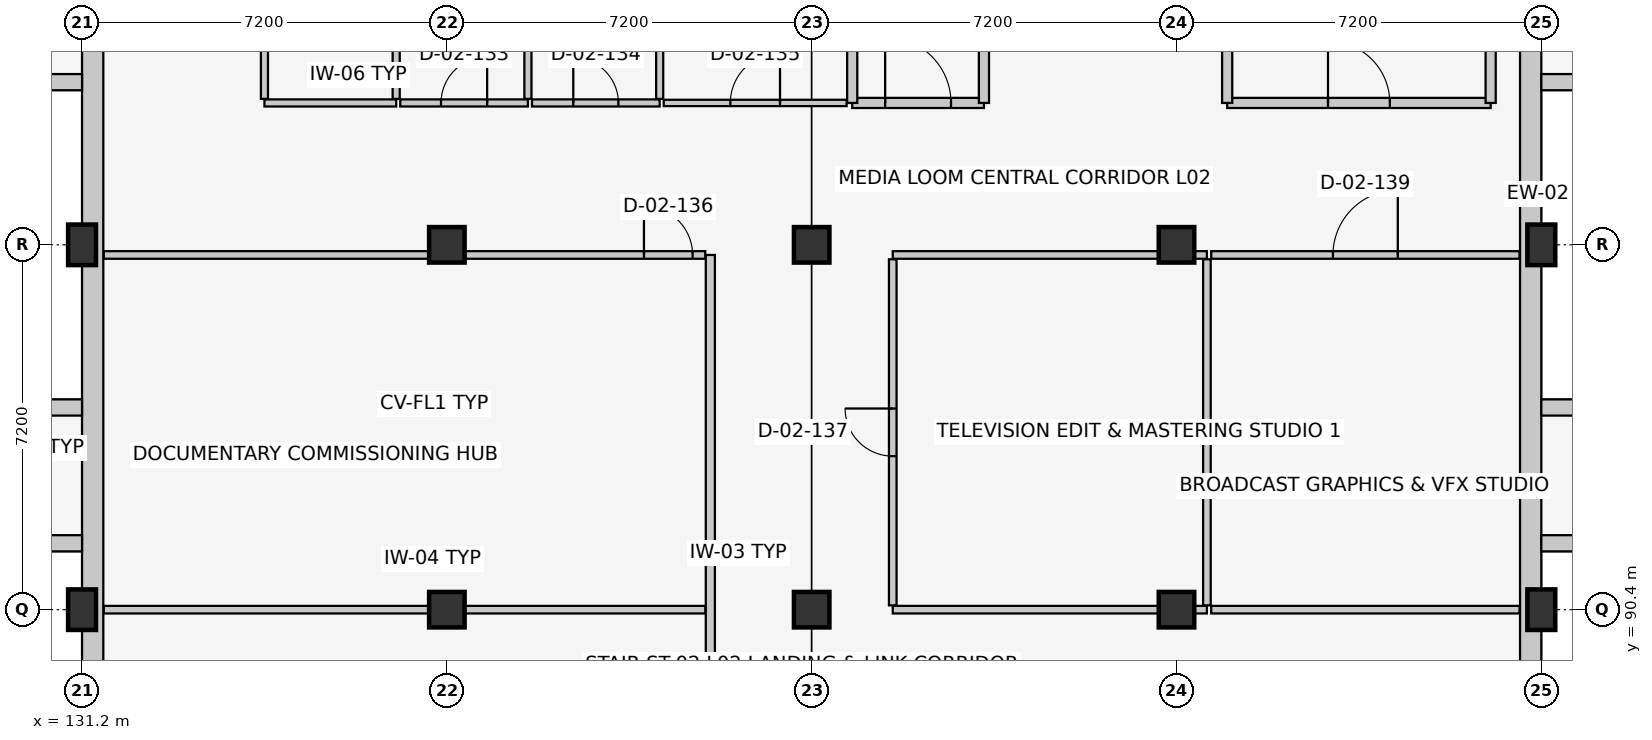
"""IFC4 building model, lengths in metres.
Left out: names, types, materials, properties, quantities, classifications, styles, units other than length and angle.
Written with IfcOpenShell. Run it as: python <this file> out.ifc"""

import sys

from ifc_helpers import new_model, si_unit, direction, frame, frame_2d, origin, origin_2d, place, context, subcontext, project, spatial, rectangle, extrude, element, fill, save


model = new_model("IFC4")
c1 = context("Model", 3, precision=1e-05, world=origin(), true_north=direction((0.0, 1.0)))
c2 = subcontext(c1, "Body", "Model", "MODEL_VIEW")
j1 = project(units=[si_unit("LENGTHUNIT", "METRE"), si_unit("PLANEANGLEUNIT", "RADIAN")], contexts=[c1])
p1 = place(None, origin())
s1 = spatial("IfcSite", under=j1, at=p1, CompositionType="ELEMENT")
p2 = place(p1, origin())
s2 = spatial("IfcBuilding", under=s1, at=p2, CompositionType="ELEMENT")
p3 = place(p2, frame((0.0, 0.0, 9.6)))
s3 = spatial("IfcBuildingStorey", under=s2, at=p3, CompositionType="ELEMENT", Elevation=9.6)
for number, where, z_axis, x_axis in (
    (1, (131.2, 90.4, 0.0), (0.0, 0.0, 1.0), (1.0, 0.0, 0.0)),
    (2, (131.2, 97.6, 0.0), (0.0, 0.0, 1.0), (1.0, 0.0, 0.0)),
):
    element("IfcColumn", number, at=place(p3, frame(where, z_axis=z_axis, x_axis=x_axis)), inside=s3, PredefinedType="COLUMN", context=c2, shape_type="SweptSolid", body=[
        extrude(rectangle(XDim=0.55, YDim=0.8, at=origin_2d()), origin(), (0.0, 0.0, 1.0), 4.2),
    ])
for number, where, z_axis, x_axis in (
    (3, (138.4, 90.4, 0.0), (0.0, 0.0, 1.0), (1.0, 0.0, 0.0)),
    (4, (138.4, 97.6, 0.0), (0.0, 0.0, 1.0), (1.0, 0.0, 0.0)),
    (5, (145.6, 90.4, 0.0), (0.0, 0.0, 1.0), (1.0, 0.0, 0.0)),
    (6, (145.6, 97.6, 0.0), (0.0, 0.0, 1.0), (1.0, 0.0, 0.0)),
    (7, (152.8, 90.4, 0.0), (0.0, 0.0, 1.0), (1.0, 0.0, 0.0)),
    (8, (152.8, 97.6, 0.0), (0.0, 0.0, 1.0), (1.0, 0.0, 0.0)),
):
    element("IfcColumn", number, at=place(p3, frame(where, z_axis=z_axis, x_axis=x_axis)), inside=s3, PredefinedType="COLUMN", context=c2, shape_type="SweptSolid", body=[
        extrude(rectangle(XDim=0.7, YDim=0.7, at=origin_2d()), origin(), (0.0, 0.0, 1.0), 4.2),
    ])
for number, where, z_axis, x_axis in (
    (9, (160.0, 90.4, 0.0), (0.0, 0.0, 1.0), (1.0, 0.0, 0.0)),
    (10, (160.0, 97.6, 0.0), (0.0, 0.0, 1.0), (1.0, 0.0, 0.0)),
):
    element("IfcColumn", number, at=place(p3, frame(where, z_axis=z_axis, x_axis=x_axis)), inside=s3, PredefinedType="COLUMN", context=c2, shape_type="SweptSolid", body=[
        extrude(rectangle(XDim=0.55, YDim=0.8, at=origin_2d()), origin(), (0.0, 0.0, 1.0), 4.2),
    ])
p4 = place(p3, frame((159.79, 112.0, 0.0), z_axis=(0.0, 0.0, 1.0), x_axis=(0.0, -1.0, 0.0)))
e11 = element("IfcWall", 11, at=p4, inside=s3, PredefinedType="SOLIDWALL", context=c2, shape_type="SweptSolid", body=[
    extrude(rectangle(XDim=28.8, YDim=0.42, at=frame_2d((14.4, 0.0))), origin(), (0.0, 0.0, 1.0), 3.345),
])
p5 = place(p3, frame((160.0, 91.71, 0.0), z_axis=(0.0, 0.0, 1.0), x_axis=(1.0, 0.0, 0.0)))
e12 = element("IfcWall", 12, at=p5, inside=s3, PredefinedType="SOLIDWALL", context=c2, shape_type="SweptSolid", body=[
    extrude(rectangle(XDim=1.35, YDim=0.32, at=frame_2d((0.675, 0.0))), origin(), (0.0, 0.0, 1.0), 3.93),
])
for number, where, z_axis, x_axis in (
    (13, (160.0, 94.39, 0.0), (0.0, 0.0, 1.0), (1.0, 0.0, 0.0)),
    (14, (160.0, 100.81, 0.0), (0.0, 0.0, 1.0), (1.0, 0.0, 0.0)),
):
    element("IfcWall", number, at=place(p3, frame(where, z_axis=z_axis, x_axis=x_axis)), inside=s3, PredefinedType="SOLIDWALL", context=c2, shape_type="SweptSolid", body=[
        extrude(rectangle(XDim=1.793, YDim=0.32, at=frame_2d((0.896, 0.0))), origin(), (0.0, 0.0, 1.0), 3.93),
    ])
p6 = place(p3, frame((131.41, 83.2, 0.0), z_axis=(0.0, 0.0, 1.0), x_axis=(0.0, 1.0, 0.0)))
e15 = element("IfcWall", 15, at=p6, inside=s3, PredefinedType="SOLIDWALL", context=c2, shape_type="SweptSolid", body=[
    extrude(rectangle(XDim=28.8, YDim=0.42, at=frame_2d((14.4, 0.0))), origin(), (0.0, 0.0, 1.0), 3.345),
])
p7 = place(p3, frame((131.2, 91.71, 0.0), z_axis=(0.0, 0.0, 1.0), x_axis=(-1.0, 0.0, 0.0)))
e16 = element("IfcWall", 16, at=p7, inside=s3, PredefinedType="SOLIDWALL", context=c2, shape_type="SweptSolid", body=[
    extrude(rectangle(XDim=1.793, YDim=0.32, at=frame_2d((0.896, 0.0))), origin(), (0.0, 0.0, 1.0), 3.93),
])
for number, where, z_axis, x_axis in (
    (17, (131.2, 94.39, 0.0), (0.0, 0.0, 1.0), (-1.0, 0.0, 0.0)),
    (18, (131.2, 100.81, 0.0), (0.0, 0.0, 1.0), (-1.0, 0.0, 0.0)),
):
    element("IfcWall", number, at=place(p3, frame(where, z_axis=z_axis, x_axis=x_axis)), inside=s3, PredefinedType="SOLIDWALL", context=c2, shape_type="SweptSolid", body=[
        extrude(rectangle(XDim=1.35, YDim=0.32, at=frame_2d((0.675, 0.0))), origin(), (0.0, 0.0, 1.0), 3.93),
    ])
p8 = place(p3, frame((146.4, 100.4, 0.0), z_axis=(0.0, 0.0, 1.0), x_axis=(1.0, 0.0, 0.0)))
e19 = element("IfcWall", 19, at=p8, inside=s3, PredefinedType="PARTITIONING", context=c2, shape_type="SweptSolid", body=[
    extrude(rectangle(XDim=2.6, YDim=0.2, at=frame_2d((1.3, 0.0))), origin(), (0.0, 0.0, 1.0), 3.95),
])
p9 = place(p8, frame((0.65, 0.0, 0.0)))
e20 = element("IfcOpeningElement", 20, at=p9, cuts=e19, PredefinedType="OPENING", context=c2, shape_type="SweptSolid", body=[
    extrude(rectangle(XDim=1.3, YDim=2.2, at=frame_2d((0.65, 1.1))), frame((0.0, 0.112, 0.0), z_axis=(0.0, -1.0, 0.0), x_axis=(1.0, 0.0, 0.0)), (0.0, 0.0, 1.0), 0.224),
])
p10 = place(p3, frame((146.4, 106.2, 0.0), z_axis=(0.0, 0.0, 1.0), x_axis=(0.0, -1.0, 0.0)))
e21 = element("IfcWall", 21, at=p10, inside=s3, PredefinedType="PARTITIONING", context=c2, shape_type="SweptSolid", body=[
    extrude(rectangle(XDim=5.8, YDim=0.2, at=frame_2d((2.9, 0.0))), origin(), (0.0, 0.0, 1.0), 3.95),
])
p11 = place(p3, frame((149.0, 100.4, 0.0), z_axis=(0.0, 0.0, 1.0), x_axis=(0.0, 1.0, 0.0)))
e22 = element("IfcWall", 22, at=p11, inside=s3, PredefinedType="PARTITIONING", context=c2, shape_type="SweptSolid", body=[
    extrude(rectangle(XDim=5.8, YDim=0.2, at=frame_2d((2.9, 0.0))), origin(), (0.0, 0.0, 1.0), 3.705),
])
p12 = place(p3, frame((153.8, 100.4, 0.0), z_axis=(0.0, 0.0, 1.0), x_axis=(1.0, 0.0, 0.0)))
e23 = element("IfcWall", 23, at=p12, inside=s3, PredefinedType="PARTITIONING", context=c2, shape_type="SweptSolid", body=[
    extrude(rectangle(XDim=5.2, YDim=0.2, at=frame_2d((2.6, 0.0))), origin(), (0.0, 0.0, 1.0), 3.95),
])
p13 = place(p12, frame((1.99, 0.0, 0.0)))
e24 = element("IfcOpeningElement", 24, at=p13, cuts=e23, PredefinedType="OPENING", context=c2, shape_type="SweptSolid", body=[
    extrude(rectangle(XDim=1.22, YDim=2.2, at=frame_2d((0.61, 1.1))), frame((0.0, 0.112, 0.0), z_axis=(0.0, -1.0, 0.0), x_axis=(1.0, 0.0, 0.0)), (0.0, 0.0, 1.0), 0.224),
])
for number, where, z_axis, x_axis in (
    (25, (153.8, 106.2, 0.0), (0.0, 0.0, 1.0), (0.0, -1.0, 0.0)),
    (26, (159.0, 100.4, 0.0), (0.0, 0.0, 1.0), (0.0, 1.0, 0.0)),
):
    element("IfcWall", number, at=place(p3, frame(where, z_axis=z_axis, x_axis=x_axis)), inside=s3, PredefinedType="PARTITIONING", context=c2, shape_type="SweptSolid", body=[
        extrude(rectangle(XDim=5.8, YDim=0.2, at=frame_2d((2.9, 0.0))), origin(), (0.0, 0.0, 1.0), 3.95),
    ])
p14 = place(p3, frame((143.6, 83.63, 0.0), z_axis=(0.0, 0.0, 1.0), x_axis=(0.0, 1.0, 0.0)))
e27 = element("IfcWall", 27, at=p14, inside=s3, PredefinedType="PARTITIONING", context=c2, shape_type="SweptSolid", body=[
    extrude(rectangle(XDim=13.77, YDim=0.18, at=frame_2d((6.885, 0.0))), origin(), (0.0, 0.0, 1.0), 3.95),
])
p15 = place(p14, frame((2.925, 0.0, 0.0)))
e28 = element("IfcOpeningElement", 28, at=p15, cuts=e27, PredefinedType="OPENING", context=c2, shape_type="SweptSolid", body=[
    extrude(rectangle(XDim=0.92, YDim=2.08, at=frame_2d((0.46, 1.04))), frame((0.0, 0.102, 0.0), z_axis=(0.0, -1.0, 0.0), x_axis=(1.0, 0.0, 0.0)), (0.0, 0.0, 1.0), 0.204),
])
p16 = place(p3, frame((134.8, 100.4, 0.0), z_axis=(0.0, 0.0, 1.0), x_axis=(1.0, 0.0, 0.0)))
e29 = element("IfcWall", 29, at=p16, inside=s3, PredefinedType="PARTITIONING", context=c2, shape_type="SweptSolid", body=[
    extrude(rectangle(XDim=2.6, YDim=0.14, at=frame_2d((1.3, 0.0))), origin(), (0.0, 0.0, 1.0), 3.95),
])
p17 = place(p3, frame((134.8, 100.48, 0.0), z_axis=(0.0, 0.0, 1.0), x_axis=(0.0, 1.0, 0.0)))
e30 = element("IfcWall", 30, at=p17, inside=s3, PredefinedType="PARTITIONING", context=c2, shape_type="SweptSolid", body=[
    extrude(rectangle(XDim=4.86, YDim=0.14, at=frame_2d((2.43, 0.0))), origin(), (0.0, 0.0, 1.0), 3.675),
])
p18 = place(p17, frame((1.93, 0.0, 0.0)))
e31 = element("IfcOpeningElement", 31, at=p18, cuts=e30, PredefinedType="OPENING", context=c2, shape_type="SweptSolid", body=[
    extrude(rectangle(XDim=1.0, YDim=2.1, at=frame_2d((0.5, 1.05))), frame((0.0, 0.082, 0.0), z_axis=(0.0, -1.0, 0.0), x_axis=(1.0, 0.0, 0.0)), (0.0, 0.0, 1.0), 0.164),
])
p19 = place(p3, frame((137.4, 100.48, 0.0), z_axis=(0.0, 0.0, 1.0), x_axis=(0.0, 1.0, 0.0)))
e32 = element("IfcWall", 32, at=p19, inside=s3, PredefinedType="PARTITIONING", context=c2, shape_type="SweptSolid", body=[
    extrude(rectangle(XDim=4.86, YDim=0.14, at=frame_2d((2.43, 0.0))), origin(), (0.0, 0.0, 1.0), 3.95),
])
p20 = place(p3, frame((137.48, 100.4, 0.0), z_axis=(0.0, 0.0, 1.0), x_axis=(1.0, 0.0, 0.0)))
e33 = element("IfcWall", 33, at=p20, inside=s3, PredefinedType="PARTITIONING", context=c2, shape_type="SweptSolid", body=[
    extrude(rectangle(XDim=2.52, YDim=0.14, at=frame_2d((1.26, 0.0))), origin(), (0.0, 0.0, 1.0), 3.95),
])
p21 = place(p20, frame((0.805, 0.0, 0.0)))
e34 = element("IfcOpeningElement", 34, at=p21, cuts=e33, PredefinedType="OPENING", context=c2, shape_type="SweptSolid", body=[
    extrude(rectangle(XDim=0.91, YDim=2.06, at=frame_2d((0.455, 1.03))), frame((0.0, 0.082, 0.0), z_axis=(0.0, -1.0, 0.0), x_axis=(1.0, 0.0, 0.0)), (0.0, 0.0, 1.0), 0.164),
])
p22 = place(p3, frame((140.0, 100.48, 0.0), z_axis=(0.0, 0.0, 1.0), x_axis=(0.0, 1.0, 0.0)))
e35 = element("IfcWall", 35, at=p22, inside=s3, PredefinedType="PARTITIONING", context=c2, shape_type="SweptSolid", body=[
    extrude(rectangle(XDim=4.86, YDim=0.14, at=frame_2d((2.43, 0.0))), origin(), (0.0, 0.0, 1.0), 3.95),
])
p23 = place(p3, frame((140.08, 100.4, 0.0), z_axis=(0.0, 0.0, 1.0), x_axis=(1.0, 0.0, 0.0)))
e36 = element("IfcWall", 36, at=p23, inside=s3, PredefinedType="PARTITIONING", context=c2, shape_type="SweptSolid", body=[
    extrude(rectangle(XDim=2.52, YDim=0.14, at=frame_2d((1.26, 0.0))), origin(), (0.0, 0.0, 1.0), 3.95),
])
p24 = place(p23, frame((0.815, 0.0, 0.0)))
e37 = element("IfcOpeningElement", 37, at=p24, cuts=e36, PredefinedType="OPENING", context=c2, shape_type="SweptSolid", body=[
    extrude(rectangle(XDim=0.89, YDim=2.05, at=frame_2d((0.445, 1.025))), frame((0.0, 0.082, 0.0), z_axis=(0.0, -1.0, 0.0), x_axis=(1.0, 0.0, 0.0)), (0.0, 0.0, 1.0), 0.164),
])
p25 = place(p3, frame((142.6, 100.48, 0.0), z_axis=(0.0, 0.0, 1.0), x_axis=(0.0, 1.0, 0.0)))
e38 = element("IfcWall", 38, at=p25, inside=s3, PredefinedType="PARTITIONING", context=c2, shape_type="SweptSolid", body=[
    extrude(rectangle(XDim=4.86, YDim=0.14, at=frame_2d((2.43, 0.0))), origin(), (0.0, 0.0, 1.0), 3.95),
])
p26 = place(p3, frame((142.68, 100.4, 0.0), z_axis=(0.0, 0.0, 1.0), x_axis=(1.0, 0.0, 0.0)))
e39 = element("IfcWall", 39, at=p26, inside=s3, PredefinedType="PARTITIONING", context=c2, shape_type="SweptSolid", body=[
    extrude(rectangle(XDim=3.61, YDim=0.125, at=frame_2d((1.805, 0.0))), origin(), (0.0, 0.0, 1.0), 3.95),
])
p27 = place(p26, frame((1.315, 0.0, 0.0)))
e40 = element("IfcOpeningElement", 40, at=p27, cuts=e39, PredefinedType="OPENING", context=c2, shape_type="SweptSolid", body=[
    extrude(rectangle(XDim=0.98, YDim=2.12, at=frame_2d((0.49, 1.06))), frame((0.0, 0.074, 0.0), z_axis=(0.0, -1.0, 0.0), x_axis=(1.0, 0.0, 0.0)), (0.0, 0.0, 1.0), 0.149),
])
p28 = place(p3, frame((131.63, 90.4, 0.0), z_axis=(0.0, 0.0, 1.0), x_axis=(1.0, 0.0, 0.0)))
e41 = element("IfcWall", 41, at=p28, inside=s3, PredefinedType="PARTITIONING", context=c2, shape_type="SweptSolid", body=[
    extrude(rectangle(XDim=11.87, YDim=0.15, at=frame_2d((5.935, 0.0))), origin(), (0.0, 0.0, 1.0), 3.225),
])
p29 = place(p3, frame((131.63, 97.4, 0.0), z_axis=(0.0, 0.0, 1.0), x_axis=(1.0, 0.0, 0.0)))
e42 = element("IfcWall", 42, at=p29, inside=s3, PredefinedType="PARTITIONING", context=c2, shape_type="SweptSolid", body=[
    extrude(rectangle(XDim=11.87, YDim=0.15, at=frame_2d((5.935, 0.0))), origin(), (0.0, 0.0, 1.0), 3.225),
])
p30 = place(p29, frame((10.66, 0.0, 0.0)))
e43 = element("IfcOpeningElement", 43, at=p30, cuts=e42, PredefinedType="OPENING", context=c2, shape_type="SweptSolid", body=[
    extrude(rectangle(XDim=0.96, YDim=2.1, at=frame_2d((0.48, 1.05))), frame((0.0, 0.087, 0.0), z_axis=(0.0, -1.0, 0.0), x_axis=(1.0, 0.0, 0.0)), (0.0, 0.0, 1.0), 0.174),
])
for number, where, z_axis, x_axis in (
    (44, (147.2, 90.4, 0.0), (0.0, 0.0, 1.0), (1.0, 0.0, 0.0)),
    (45, (147.2, 97.4, 0.0), (0.0, 0.0, 1.0), (1.0, 0.0, 0.0)),
):
    element("IfcWall", number, at=place(p3, frame(where, z_axis=z_axis, x_axis=x_axis)), inside=s3, PredefinedType="PARTITIONING", context=c2, shape_type="SweptSolid", body=[
        extrude(rectangle(XDim=6.2, YDim=0.15, at=frame_2d((3.1, 0.0))), origin(), (0.0, 0.0, 1.0), 3.075),
    ])
p31 = place(p3, frame((147.2, 90.485, 0.0), z_axis=(0.0, 0.0, 1.0), x_axis=(0.0, 1.0, 0.0)))
e46 = element("IfcWall", 46, at=p31, inside=s3, PredefinedType="PARTITIONING", context=c2, shape_type="SweptSolid", body=[
    extrude(rectangle(XDim=6.83, YDim=0.15, at=frame_2d((3.415, 0.0))), origin(), (0.0, 0.0, 1.0), 3.95),
])
p32 = place(p31, frame((2.945, 0.0, 0.0)))
e47 = element("IfcOpeningElement", 47, at=p32, cuts=e46, PredefinedType="OPENING", context=c2, shape_type="SweptSolid", body=[
    extrude(rectangle(XDim=0.94, YDim=2.1, at=frame_2d((0.47, 1.05))), frame((0.0, 0.087, 0.0), z_axis=(0.0, -1.0, 0.0), x_axis=(1.0, 0.0, 0.0)), (0.0, 0.0, 1.0), 0.174),
])
p33 = place(p3, frame((153.4, 90.485, 0.0), z_axis=(0.0, 0.0, 1.0), x_axis=(0.0, 1.0, 0.0)))
e48 = element("IfcWall", 48, at=p33, inside=s3, PredefinedType="PARTITIONING", context=c2, shape_type="SweptSolid", body=[
    extrude(rectangle(XDim=6.83, YDim=0.15, at=frame_2d((3.415, 0.0))), origin(), (0.0, 0.0, 1.0), 3.95),
])
p34 = place(p3, frame((153.485, 90.4, 0.0), z_axis=(0.0, 0.0, 1.0), x_axis=(1.0, 0.0, 0.0)))
e49 = element("IfcWall", 49, at=p34, inside=s3, PredefinedType="PARTITIONING", context=c2, shape_type="SweptSolid", body=[
    extrude(rectangle(XDim=6.085, YDim=0.15, at=frame_2d((3.042, 0.0))), origin(), (0.0, 0.0, 1.0), 3.075),
])
p35 = place(p3, frame((153.485, 97.4, 0.0), z_axis=(0.0, 0.0, 1.0), x_axis=(1.0, 0.0, 0.0)))
e50 = element("IfcWall", 50, at=p35, inside=s3, PredefinedType="PARTITIONING", context=c2, shape_type="SweptSolid", body=[
    extrude(rectangle(XDim=6.085, YDim=0.15, at=frame_2d((3.042, 0.0))), origin(), (0.0, 0.0, 1.0), 3.075),
])
p36 = place(p35, frame((2.403, 0.0, 0.0)))
e51 = element("IfcOpeningElement", 51, at=p36, cuts=e50, PredefinedType="OPENING", context=c2, shape_type="SweptSolid", body=[
    extrude(rectangle(XDim=1.28, YDim=2.2, at=frame_2d((0.64, 1.1))), frame((0.0, 0.087, 0.0), z_axis=(0.0, -1.0, 0.0), x_axis=(1.0, 0.0, 0.0)), (0.0, 0.0, 1.0), 0.174),
])
p37 = place(p9, origin())
e52 = element("IfcDoor", 52, at=p37, inside=s3, OperationType="SINGLE_SWING_LEFT", PredefinedType="DOOR", context=c2, shape_type="SweptSolid", body=[
    extrude(rectangle(XDim=1.3, YDim=2.2, at=frame_2d((0.65, 1.1))), frame((0.0, 0.025, 0.0), z_axis=(0.0, -1.0, 0.0), x_axis=(1.0, 0.0, 0.0)), (0.0, 0.0, 1.0), 0.05),
])
fill(e20, e52)
p38 = place(p13, origin())
e53 = element("IfcDoor", 53, at=p38, inside=s3, OperationType="SINGLE_SWING_LEFT", PredefinedType="DOOR", context=c2, shape_type="SweptSolid", body=[
    extrude(rectangle(XDim=1.22, YDim=2.2, at=frame_2d((0.61, 1.1))), frame((0.0, 0.025, 0.0), z_axis=(0.0, -1.0, 0.0), x_axis=(1.0, 0.0, 0.0)), (0.0, 0.0, 1.0), 0.05),
])
fill(e24, e53)
p39 = place(p21, origin())
e54 = element("IfcDoor", 54, at=p39, inside=s3, OperationType="SINGLE_SWING_RIGHT", PredefinedType="DOOR", context=c2, shape_type="SweptSolid", body=[
    extrude(rectangle(XDim=0.91, YDim=2.06, at=frame_2d((0.455, 1.03))), frame((0.0, 0.025, 0.0), z_axis=(0.0, -1.0, 0.0), x_axis=(1.0, 0.0, 0.0)), (0.0, 0.0, 1.0), 0.05),
])
fill(e34, e54)
p40 = place(p24, origin())
e55 = element("IfcDoor", 55, at=p40, inside=s3, OperationType="SINGLE_SWING_LEFT", PredefinedType="DOOR", context=c2, shape_type="SweptSolid", body=[
    extrude(rectangle(XDim=0.89, YDim=2.05, at=frame_2d((0.445, 1.025))), frame((0.0, 0.025, 0.0), z_axis=(0.0, -1.0, 0.0), x_axis=(1.0, 0.0, 0.0)), (0.0, 0.0, 1.0), 0.05),
])
fill(e37, e55)
p41 = place(p27, origin())
e56 = element("IfcDoor", 56, at=p41, inside=s3, OperationType="SINGLE_SWING_RIGHT", PredefinedType="DOOR", context=c2, shape_type="SweptSolid", body=[
    extrude(rectangle(XDim=0.98, YDim=2.12, at=frame_2d((0.49, 1.06))), frame((0.0, 0.025, 0.0), z_axis=(0.0, -1.0, 0.0), x_axis=(1.0, 0.0, 0.0)), (0.0, 0.0, 1.0), 0.05),
])
fill(e40, e56)
p42 = place(p30, origin())
e57 = element("IfcDoor", 57, at=p42, inside=s3, OperationType="SINGLE_SWING_LEFT", PredefinedType="DOOR", context=c2, shape_type="SweptSolid", body=[
    extrude(rectangle(XDim=0.96, YDim=2.1, at=frame_2d((0.48, 1.05))), frame((0.0, 0.025, 0.0), z_axis=(0.0, -1.0, 0.0), x_axis=(1.0, 0.0, 0.0)), (0.0, 0.0, 1.0), 0.05),
])
fill(e43, e57)
p43 = place(p32, origin())
e58 = element("IfcDoor", 58, at=p43, inside=s3, OperationType="SINGLE_SWING_RIGHT", PredefinedType="DOOR", context=c2, shape_type="SweptSolid", body=[
    extrude(rectangle(XDim=0.94, YDim=2.1, at=frame_2d((0.47, 1.05))), frame((0.0, 0.025, 0.0), z_axis=(0.0, -1.0, 0.0), x_axis=(1.0, 0.0, 0.0)), (0.0, 0.0, 1.0), 0.05),
])
fill(e47, e58)
p44 = place(p36, origin())
e59 = element("IfcDoor", 59, at=p44, inside=s3, OperationType="SINGLE_SWING_RIGHT", PredefinedType="DOOR", context=c2, shape_type="SweptSolid", body=[
    extrude(rectangle(XDim=1.28, YDim=2.2, at=frame_2d((0.64, 1.1))), frame((0.0, 0.025, 0.0), z_axis=(0.0, -1.0, 0.0), x_axis=(1.0, 0.0, 0.0)), (0.0, 0.0, 1.0), 0.05),
])
fill(e51, e59)
save(model, sys.argv[1])
